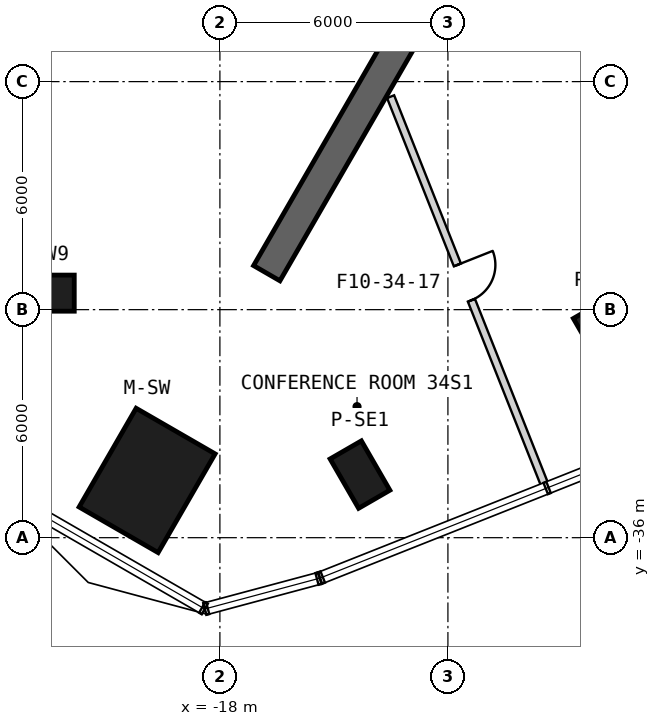
"""IFC4 building model, lengths in metres.
Left out: names, types, materials, properties, quantities, classifications, styles, units other than length and angle.
Written with IfcOpenShell. Run it as: python <this file> out.ifc"""

import sys

from ifc_helpers import new_model, si_unit, direction, frame, frame_2d, origin, origin_2d, place, context, subcontext, project, spatial, rectangle, extrude, element, fill, save


model = new_model("IFC4")
c1 = context("Model", 3, precision=1e-05, world=origin(), true_north=direction((0.0, 1.0)))
c2 = subcontext(c1, "Body", "Model", "MODEL_VIEW")
j1 = project(units=[si_unit("LENGTHUNIT", "METRE"), si_unit("PLANEANGLEUNIT", "RADIAN")], contexts=[c1])
p1 = place(None, origin())
s1 = spatial("IfcSite", under=j1, at=p1, CompositionType="ELEMENT")
p2 = place(p1, origin())
s2 = spatial("IfcBuilding", under=s1, at=p2, CompositionType="ELEMENT")
p3 = place(p2, frame((0.0, 0.0, 156.2)))
s3 = spatial("IfcBuildingStorey", under=s2, at=p3, CompositionType="ELEMENT", Elevation=156.2)
p4 = place(p3, frame((-19.915, -34.494, 0.0), z_axis=(0.0, 0.0, 1.0), x_axis=(-0.5, -0.866025403784, 0.0)))
e1 = element("IfcColumn", 1, at=p4, inside=s3, PredefinedType="COLUMN", context=c2, shape_type="SweptSolid", body=[
    extrude(rectangle(XDim=3.0, YDim=2.4, at=origin_2d()), origin(), (0.0, 0.0, 1.0), 7.0),
])
for number, where, z_axis, x_axis in (
    (2, (-22.583, -29.566, 0.0), (0.0, 0.0, 1.0), (-1.0, 0.0, 0.0)),
    (3, (-14.313, -34.34, 0.0), (0.0, 0.0, 1.0), (0.5, -0.866, 0.0)),
    (4, (-7.912, -30.644, 0.0), (0.0, 0.0, 1.0), (0.5, -0.866, 0.0)),
):
    element("IfcColumn", number, at=place(p3, frame(where, z_axis=z_axis, x_axis=x_axis)), inside=s3, PredefinedType="COLUMN", context=c2, shape_type="SweptSolid", body=[
        extrude(rectangle(XDim=1.5, YDim=0.95, at=origin_2d()), origin(), (0.0, 0.0, 1.0), 7.0),
    ])
p5 = place(p3, frame((-10.575, -18.316, 0.0), z_axis=(0.0, 0.0, 1.0), x_axis=(-0.500002326941, -0.86602406032, 0.0)))
e5 = element("IfcWall", 5, at=p5, inside=s3, PredefinedType="SHEAR", context=c2, shape_type="SweptSolid", body=[
    extrude(rectangle(XDim=12.384, YDim=0.8, at=frame_2d((6.192, 0.0))), origin(), (0.0, 0.0, 1.0), 7.0),
])
p6 = place(p5, frame((2.05, 0.0, 0.0)))
e6 = element("IfcOpeningElement", 6, at=p6, cuts=e5, PredefinedType="OPENING", context=c2, shape_type="SweptSolid", body=[
    extrude(rectangle(XDim=1.4, YDim=2.4, at=frame_2d((0.7, 1.2))), frame((0.0, 0.41, 0.0), z_axis=(0.0, -1.0, 0.0), x_axis=(1.0, 0.0, 0.0)), (0.0, 0.0, 1.0), 0.82),
])
p7 = place(p3, frame((-13.508, -24.396, 0.0), z_axis=(0.0, 0.0, 1.0), x_axis=(0.368929458487, -0.92945739798, 0.0)))
e7 = element("IfcWall", 7, at=p7, inside=s3, PredefinedType="PARTITIONING", context=c2, shape_type="SweptSolid", body=[
    extrude(rectangle(XDim=11.088, YDim=0.2, at=frame_2d((5.544, 0.0))), origin(), (0.0, 0.0, 1.0), 5.612),
])
p8 = place(p7, frame((4.762, 0.0, 0.0)))
e8 = element("IfcOpeningElement", 8, at=p8, cuts=e7, PredefinedType="OPENING", context=c2, shape_type="SweptSolid", body=[
    extrude(rectangle(XDim=1.0, YDim=2.1, at=frame_2d((0.5, 1.05))), frame((0.0, 0.11, 0.0), z_axis=(0.0, -1.0, 0.0), x_axis=(1.0, 0.0, 0.0)), (0.0, 0.0, 1.0), 0.22),
])
p9 = place(p8, origin())
e9 = element("IfcDoor", 9, at=p9, inside=s3, OperationType="SINGLE_SWING_LEFT", PredefinedType="USERDEFINED", context=c2, shape_type="SweptSolid", body=[
    extrude(rectangle(XDim=1.0, YDim=2.1, at=frame_2d((0.5, 1.05))), frame((0.0, 0.025, 0.0), z_axis=(0.0, -1.0, 0.0), x_axis=(1.0, 0.0, 0.0)), (0.0, 0.0, 1.0), 0.05),
])
fill(e8, e9)
save(model, sys.argv[1])
